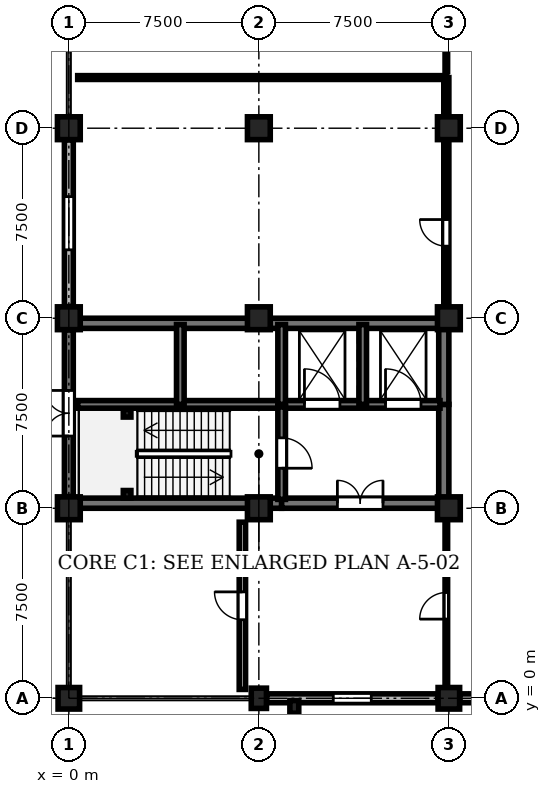
"""IFC4 building model, lengths in metres.
Left out: names, types, materials, properties, quantities, classifications, styles, units other than length and angle.
Written with IfcOpenShell. Run it as: python <this file> out.ifc"""

import sys

from ifc_helpers import new_model, si_unit, direction, frame, frame_2d, origin, origin_with_axes, origin_2d, place, context, subcontext, project, spatial, rectangle, circle, i_section, extrude, element, fill, save


model = new_model("IFC4")
c1 = context("Model", 3, precision=1e-05, world=origin(), true_north=direction((0.0, 1.0)))
c2 = subcontext(c1, "Body", "Model", "MODEL_VIEW")
j1 = project(units=[si_unit("LENGTHUNIT", "METRE"), si_unit("PLANEANGLEUNIT", "RADIAN")], contexts=[c1])
p1 = place(None, origin())
s1 = spatial("IfcSite", under=j1, at=p1, CompositionType="ELEMENT")
p2 = place(p1, origin())
s2 = spatial("IfcBuilding", under=s1, at=p2, CompositionType="ELEMENT")
p3 = place(p2, origin())
s3 = spatial("IfcBuildingStorey", under=s2, at=p3, CompositionType="ELEMENT", Elevation=0.0)
p4 = place(p3, origin_with_axes())
e1 = element("IfcColumn", 1, at=p4, inside=s3, PredefinedType="COLUMN", context=c2, shape_type="SweptSolid", body=[
    extrude(rectangle(XDim=0.85, YDim=0.85, at=origin_2d()), origin(), (0.0, 0.0, 1.0), 4.8),
])
for number, where, z_axis, x_axis in (
    (2, (0.0, 7.5, 0.0), (0.0, 0.0, 1.0), (1.0, 0.0, 0.0)),
    (3, (0.0, 15.0, 0.0), (0.0, 0.0, 1.0), (1.0, 0.0, 0.0)),
):
    element("IfcColumn", number, at=place(p3, frame(where, z_axis=z_axis, x_axis=x_axis)), inside=s3, PredefinedType="COLUMN", context=c2, shape_type="SweptSolid", body=[
        extrude(rectangle(XDim=0.9, YDim=0.9, at=origin_2d()), origin(), (0.0, 0.0, 1.0), 4.8),
    ])
p5 = place(p3, frame((0.0, 22.5, 0.0), z_axis=(0.0, 0.0, 1.0), x_axis=(1.0, 0.0, 0.0)))
e4 = element("IfcColumn", 4, at=p5, inside=s3, PredefinedType="COLUMN", context=c2, shape_type="SweptSolid", body=[
    extrude(circle(Radius=0.45, at=origin_2d()), origin(), (0.0, 0.0, 1.0), 4.8),
])
p6 = place(p3, frame((7.5, 0.0, 0.0), z_axis=(0.0, 0.0, 1.0), x_axis=(1.0, 0.0, 0.0)))
e5 = element("IfcColumn", 5, at=p6, inside=s3, PredefinedType="COLUMN", context=c2, shape_type="SweptSolid", body=[
    extrude(rectangle(XDim=0.6, YDim=0.8, at=origin_2d()), origin(), (0.0, 0.0, 1.0), 4.8),
])
p7 = place(p3, frame((7.5, 7.5, 0.0), z_axis=(0.0, 0.0, 1.0), x_axis=(1.0, 0.0, 0.0)))
e6 = element("IfcColumn", 6, at=p7, inside=s3, PredefinedType="COLUMN", context=c2, shape_type="SweptSolid", body=[
    extrude(rectangle(XDim=0.9, YDim=0.9, at=origin_2d()), origin(), (0.0, 0.0, 1.0), 4.8),
])
p8 = place(p3, frame((7.5, 15.0, 0.0), z_axis=(0.0, 0.0, 1.0), x_axis=(1.0, 0.0, 0.0)))
e7 = element("IfcColumn", 7, at=p8, inside=s3, PredefinedType="COLUMN", context=c2, shape_type="SweptSolid", body=[
    extrude(circle(Radius=0.45, at=origin_2d()), origin(), (0.0, 0.0, 1.0), 4.8),
])
p9 = place(p3, frame((7.5, 22.5, 0.0), z_axis=(0.0, 0.0, 1.0), x_axis=(1.0, 0.0, 0.0)))
e8 = element("IfcColumn", 8, at=p9, inside=s3, PredefinedType="COLUMN", context=c2, shape_type="SweptSolid", body=[
    extrude(rectangle(XDim=0.9, YDim=0.9, at=origin_2d()), origin(), (0.0, 0.0, 1.0), 4.8),
])
p10 = place(p3, frame((15.0, 0.0, 0.0), z_axis=(0.0, 0.0, 1.0), x_axis=(1.0, 0.0, 0.0)))
e9 = element("IfcColumn", 9, at=p10, inside=s3, PredefinedType="COLUMN", context=c2, shape_type="SweptSolid", body=[
    extrude(rectangle(XDim=0.85, YDim=0.85, at=origin_2d()), origin(), (0.0, 0.0, 1.0), 4.8),
])
p11 = place(p3, frame((15.0, 7.5, 0.0), z_axis=(0.0, 0.0, 1.0), x_axis=(1.0, 0.0, 0.0)))
e10 = element("IfcColumn", 10, at=p11, inside=s3, PredefinedType="COLUMN", context=c2, shape_type="SweptSolid", body=[
    extrude(circle(Radius=0.45, at=origin_2d()), origin(), (0.0, 0.0, 1.0), 4.8),
])
for number, where, z_axis, x_axis in (
    (11, (15.0, 15.0, 0.0), (0.0, 0.0, 1.0), (1.0, 0.0, 0.0)),
    (12, (15.0, 22.5, 0.0), (0.0, 0.0, 1.0), (1.0, 0.0, 0.0)),
):
    element("IfcColumn", number, at=place(p3, frame(where, z_axis=z_axis, x_axis=x_axis)), inside=s3, PredefinedType="COLUMN", context=c2, shape_type="SweptSolid", body=[
        extrude(rectangle(XDim=0.9, YDim=0.9, at=origin_2d()), origin(), (0.0, 0.0, 1.0), 4.8),
    ])
p12 = place(p3, frame((8.9, -0.34, 0.0), z_axis=(0.0, 0.0, 1.0), x_axis=(1.0, 0.0, 0.0)))
e13 = element("IfcColumn", 13, at=p12, inside=s3, PredefinedType="PILASTER", context=c2, shape_type="SweptSolid", body=[
    extrude(rectangle(XDim=0.35, YDim=0.5, at=origin_2d()), origin(), (0.0, 0.0, 1.0), 4.1),
])
for number, where, z_axis, x_axis in (
    (14, (2.3, 8.05, 0.0), (0.0, 0.0, 1.0), (1.0, 0.0, 0.0)),
    (15, (2.3, 11.25, 0.0), (0.0, 0.0, 1.0), (1.0, 0.0, 0.0)),
):
    element("IfcColumn", number, at=place(p3, frame(where, z_axis=z_axis, x_axis=x_axis)), inside=s3, PredefinedType="COLUMN", context=c2, shape_type="SweptSolid", body=[
        extrude(i_section(OverallWidth=0.3, OverallDepth=0.3, WebThickness=0.011, FlangeThickness=0.019, FilletRadius=0.027, at=origin_2d()), origin(), (0.0, 0.0, 1.0), 4.8),
    ])
p13 = place(p3, frame((0.0, 7.96, 0.0), z_axis=(0.0, 0.0, 1.0), x_axis=(0.0, 1.0, 0.0)))
e16 = element("IfcWall", 16, at=p13, inside=s3, PredefinedType="SHEAR", context=c2, shape_type="SweptSolid", body=[
    extrude(rectangle(XDim=6.58, YDim=0.35, at=frame_2d((3.29, 0.0))), origin(), (0.0, 0.0, 1.0), 4.5),
])
p14 = place(p13, frame((2.39, 0.0, 0.0)))
e17 = element("IfcOpeningElement", 17, at=p14, cuts=e16, PredefinedType="OPENING", context=c2, shape_type="SweptSolid", body=[
    extrude(rectangle(XDim=1.8, YDim=2.5, at=frame_2d((0.9, 1.25))), frame((0.0, 0.185, 0.0), z_axis=(0.0, -1.0, 0.0), x_axis=(1.0, 0.0, 0.0)), (0.0, 0.0, 1.0), 0.37),
])
p15 = place(p3, frame((0.0, 15.46, 0.0), z_axis=(0.0, 0.0, 1.0), x_axis=(0.0, 1.0, 0.0)))
e18 = element("IfcWall", 18, at=p15, inside=s3, PredefinedType="STANDARD", context=c2, shape_type="SweptSolid", body=[
    extrude(rectangle(XDim=6.58, YDim=0.35, at=frame_2d((3.29, 0.0))), origin(), (0.0, 0.0, 1.0), 3.9),
])
p16 = place(p15, frame((2.24, 0.0, 0.9)))
e19 = element("IfcOpeningElement", 19, at=p16, cuts=e18, PredefinedType="OPENING", context=c2, shape_type="SweptSolid", body=[
    extrude(rectangle(XDim=2.1, YDim=2.4, at=frame_2d((1.05, 1.2))), frame((0.0, 0.185, 0.0), z_axis=(0.0, -1.0, 0.0), x_axis=(1.0, 0.0, 0.0)), (0.0, 0.0, 1.0), 0.37),
])
p17 = place(p3, frame((14.565, 0.0, 0.0), z_axis=(0.0, 0.0, 1.0), x_axis=(-1.0, 0.0, 0.0)))
e20 = element("IfcWall", 20, at=p17, inside=s3, PredefinedType="STANDARD", context=c2, shape_type="SweptSolid", body=[
    extrude(rectangle(XDim=6.755, YDim=0.35, at=frame_2d((3.377, 0.0))), origin(), (0.0, 0.0, 1.0), 3.95),
])
p18 = place(p17, frame((2.627, 0.0, 0.9)))
e21 = element("IfcOpeningElement", 21, at=p18, cuts=e20, PredefinedType="OPENING", context=c2, shape_type="SweptSolid", body=[
    extrude(rectangle(XDim=1.5, YDim=2.4, at=frame_2d((0.75, 1.2))), frame((0.0, 0.185, 0.0), z_axis=(0.0, -1.0, 0.0), x_axis=(1.0, 0.0, 0.0)), (0.0, 0.0, 1.0), 0.37),
])
p19 = place(p3, frame((22.19, 0.0, 0.0), z_axis=(0.0, 0.0, 1.0), x_axis=(-1.0, 0.0, 0.0)))
e22 = element("IfcWall", 22, at=p19, inside=s3, PredefinedType="STANDARD", context=c2, shape_type="SweptSolid", body=[
    extrude(rectangle(XDim=6.755, YDim=0.35, at=frame_2d((3.377, 0.0))), origin(), (0.0, 0.0, 1.0), 3.95),
])
p20 = place(p19, frame((2.327, 0.0, 0.9)))
e23 = element("IfcOpeningElement", 23, at=p20, cuts=e22, PredefinedType="OPENING", context=c2, shape_type="SweptSolid", body=[
    extrude(rectangle(XDim=2.1, YDim=2.4, at=frame_2d((1.05, 1.2))), frame((0.0, 0.185, 0.0), z_axis=(0.0, -1.0, 0.0), x_axis=(1.0, 0.0, 0.0)), (0.0, 0.0, 1.0), 0.37),
])
p21 = place(p3, frame((0.35, 7.7, 0.0), z_axis=(0.0, 0.0, 1.0), x_axis=(1.0, 0.0, 0.0)))
e24 = element("IfcWall", 24, at=p21, inside=s3, PredefinedType="SHEAR", context=c2, shape_type="SweptSolid", body=[
    extrude(rectangle(XDim=8.05, YDim=0.4, at=frame_2d((4.025, 0.0))), origin(), (0.0, 0.0, 1.0), 4.5),
])
p22 = place(p3, frame((8.4, 7.7, 0.0), z_axis=(0.0, 0.0, 1.0), x_axis=(1.0, 0.0, 0.0)))
e25 = element("IfcWall", 25, at=p22, inside=s3, PredefinedType="SHEAR", context=c2, shape_type="SweptSolid", body=[
    extrude(rectangle(XDim=6.25, YDim=0.4, at=frame_2d((3.125, 0.0))), origin(), (0.0, 0.0, 1.0), 4.5),
])
p23 = place(p22, frame((2.2, 0.0, 0.0)))
e26 = element("IfcOpeningElement", 26, at=p23, cuts=e25, PredefinedType="OPENING", context=c2, shape_type="SweptSolid", body=[
    extrude(rectangle(XDim=1.8, YDim=2.25, at=frame_2d((0.9, 1.125))), frame((0.0, 0.21, 0.0), z_axis=(0.0, -1.0, 0.0), x_axis=(1.0, 0.0, 0.0)), (0.0, 0.0, 1.0), 0.42),
])
p24 = place(p3, frame((0.35, 14.8, 0.0), z_axis=(0.0, 0.0, 1.0), x_axis=(1.0, 0.0, 0.0)))
e27 = element("IfcWall", 27, at=p24, inside=s3, PredefinedType="SHEAR", context=c2, shape_type="SweptSolid", body=[
    extrude(rectangle(XDim=14.3, YDim=0.4, at=frame_2d((7.15, 0.0))), origin(), (0.0, 0.0, 1.0), 4.5),
])
p25 = place(p3, frame((14.8, 7.85, 0.0), z_axis=(0.0, 0.0, 1.0), x_axis=(0.0, 1.0, 0.0)))
e28 = element("IfcWall", 28, at=p25, inside=s3, PredefinedType="SHEAR", context=c2, shape_type="SweptSolid", body=[
    extrude(rectangle(XDim=3.75, YDim=0.4, at=frame_2d((1.875, 0.0))), origin(), (0.0, 0.0, 1.0), 4.5),
])
p26 = place(p3, frame((14.8, 11.6, 0.0), z_axis=(0.0, 0.0, 1.0), x_axis=(0.0, 1.0, 0.0)))
e29 = element("IfcWall", 29, at=p26, inside=s3, PredefinedType="SHEAR", context=c2, shape_type="SweptSolid", body=[
    extrude(rectangle(XDim=3.05, YDim=0.4, at=frame_2d((1.525, 0.0))), origin(), (0.0, 0.0, 1.0), 4.5),
])
p27 = place(p3, frame((0.35, 11.6, 0.0), z_axis=(0.0, 0.0, 1.0), x_axis=(1.0, 0.0, 0.0)))
e30 = element("IfcWall", 30, at=p27, inside=s3, PredefinedType="SHEAR", context=c2, shape_type="SweptSolid", body=[
    extrude(rectangle(XDim=8.05, YDim=0.3, at=frame_2d((4.025, 0.0))), origin(), (0.0, 0.0, 1.0), 4.5),
])
p28 = place(p3, frame((8.4, 11.6, 0.0), z_axis=(0.0, 0.0, 1.0), x_axis=(1.0, 0.0, 0.0)))
e31 = element("IfcWall", 31, at=p28, inside=s3, PredefinedType="SHEAR", context=c2, shape_type="SweptSolid", body=[
    extrude(rectangle(XDim=6.25, YDim=0.3, at=frame_2d((3.125, 0.0))), origin(), (0.0, 0.0, 1.0), 4.5),
])
p29 = place(p28, frame((0.9, 0.0, 0.0)))
e32 = element("IfcOpeningElement", 32, at=p29, cuts=e31, PredefinedType="OPENING", context=c2, shape_type="SweptSolid", body=[
    extrude(rectangle(XDim=1.4, YDim=2.25, at=frame_2d((0.7, 1.125))), frame((0.0, 0.16, 0.0), z_axis=(0.0, -1.0, 0.0), x_axis=(1.0, 0.0, 0.0)), (0.0, 0.0, 1.0), 0.32),
])
p30 = place(p28, frame((4.1, 0.0, 0.0)))
e33 = element("IfcOpeningElement", 33, at=p30, cuts=e31, PredefinedType="OPENING", context=c2, shape_type="SweptSolid", body=[
    extrude(rectangle(XDim=1.4, YDim=2.25, at=frame_2d((0.7, 1.125))), frame((0.0, 0.16, 0.0), z_axis=(0.0, -1.0, 0.0), x_axis=(1.0, 0.0, 0.0)), (0.0, 0.0, 1.0), 0.32),
])
p31 = place(p3, frame((8.4, 11.5, 0.0), z_axis=(0.0, 0.0, 1.0), x_axis=(0.0, -1.0, 0.0)))
e34 = element("IfcWall", 34, at=p31, inside=s3, PredefinedType="SHEAR", context=c2, shape_type="SweptSolid", body=[
    extrude(rectangle(XDim=3.65, YDim=0.3, at=frame_2d((1.825, 0.0))), origin(), (0.0, 0.0, 1.0), 4.5),
])
p32 = place(p31, frame((1.22, 0.0, 0.0)))
e35 = element("IfcOpeningElement", 35, at=p32, cuts=e34, PredefinedType="OPENING", context=c2, shape_type="SweptSolid", body=[
    extrude(rectangle(XDim=1.2, YDim=2.25, at=frame_2d((0.6, 1.125))), frame((0.0, 0.16, 0.0), z_axis=(0.0, -1.0, 0.0), x_axis=(1.0, 0.0, 0.0)), (0.0, 0.0, 1.0), 0.32),
])
for number, where, z_axis, x_axis in (
    (36, (4.4, 11.6, 0.0), (0.0, 0.0, 1.0), (0.0, 1.0, 0.0)),
    (37, (8.4, 11.6, 0.0), (0.0, 0.0, 1.0), (0.0, 1.0, 0.0)),
    (38, (11.6, 11.6, 0.0), (0.0, 0.0, 1.0), (0.0, 1.0, 0.0)),
):
    element("IfcWall", number, at=place(p3, frame(where, z_axis=z_axis, x_axis=x_axis)), inside=s3, PredefinedType="SHEAR", context=c2, shape_type="SweptSolid", body=[
        extrude(rectangle(XDim=3.15, YDim=0.3, at=frame_2d((1.575, 0.0))), origin(), (0.0, 0.0, 1.0), 4.5),
    ])
p33 = place(p3, frame((6.85, 0.35, 0.0), z_axis=(0.0, 0.0, 1.0), x_axis=(0.0, 1.0, 0.0)))
e39 = element("IfcWall", 39, at=p33, inside=s3, PredefinedType="STANDARD", context=c2, shape_type="SweptSolid", body=[
    extrude(rectangle(XDim=6.6, YDim=0.25, at=frame_2d((3.3, 0.0))), origin(), (0.0, 0.0, 1.0), 4.485),
])
p34 = place(p33, frame((2.75, 0.0, 0.0)))
e40 = element("IfcOpeningElement", 40, at=p34, cuts=e39, PredefinedType="OPENING", context=c2, shape_type="SweptSolid", body=[
    extrude(rectangle(XDim=1.1, YDim=2.2, at=frame_2d((0.55, 1.1))), frame((0.0, 0.135, 0.0), z_axis=(0.0, -1.0, 0.0), x_axis=(1.0, 0.0, 0.0)), (0.0, 0.0, 1.0), 0.27),
])
p35 = place(p3, frame((14.9, 0.35, 0.0), z_axis=(0.0, 0.0, 1.0), x_axis=(0.0, 1.0, 0.0)))
e41 = element("IfcWall", 41, at=p35, inside=s3, PredefinedType="PARTITIONING", context=c2, shape_type="SweptSolid", body=[
    extrude(rectangle(XDim=6.6, YDim=0.1, at=frame_2d((3.3, 0.0))), origin(), (0.0, 0.0, 1.0), 3.935),
])
p36 = place(p35, frame((2.775, 0.0, 0.0)))
e42 = element("IfcOpeningElement", 42, at=p36, cuts=e41, PredefinedType="OPENING", context=c2, shape_type="SweptSolid", body=[
    extrude(rectangle(XDim=1.05, YDim=2.2, at=frame_2d((0.525, 1.1))), frame((0.0, 0.06, 0.0), z_axis=(0.0, -1.0, 0.0), x_axis=(1.0, 0.0, 0.0)), (0.0, 0.0, 1.0), 0.12),
])
p37 = place(p3, frame((14.9, 15.3, 0.0), z_axis=(0.0, 0.0, 1.0), x_axis=(0.0, 1.0, 0.0)))
e43 = element("IfcWall", 43, at=p37, inside=s3, PredefinedType="STANDARD", context=c2, shape_type="SweptSolid", body=[
    extrude(rectangle(XDim=9.2, YDim=0.2, at=frame_2d((4.6, 0.0))), origin(), (0.0, 0.0, 1.0), 3.785),
])
p38 = place(p37, frame((2.545, 0.0, 0.0)))
e44 = element("IfcOpeningElement", 44, at=p38, cuts=e43, PredefinedType="OPENING", context=c2, shape_type="SweptSolid", body=[
    extrude(rectangle(XDim=1.05, YDim=2.2, at=frame_2d((0.525, 1.1))), frame((0.0, 0.11, 0.0), z_axis=(0.0, -1.0, 0.0), x_axis=(1.0, 0.0, 0.0)), (0.0, 0.0, 1.0), 0.22),
])
p39 = place(p3, frame((14.9, 24.75, 0.0), z_axis=(0.0, 0.0, 1.0), x_axis=(0.0, 1.0, 0.0)))
e45 = element("IfcWall", 45, at=p39, inside=s3, PredefinedType="PARTITIONING", context=c2, shape_type="SweptSolid", body=[
    extrude(rectangle(XDim=9.75, YDim=0.1, at=frame_2d((4.875, 0.0))), origin(), (0.0, 0.0, 1.0), 3.785),
])
p40 = place(p39, frame((1.89, 0.0, 0.0)))
e46 = element("IfcOpeningElement", 46, at=p40, cuts=e45, PredefinedType="OPENING", context=c2, shape_type="SweptSolid", body=[
    extrude(rectangle(XDim=1.05, YDim=2.2, at=frame_2d((0.525, 1.1))), frame((0.0, 0.06, 0.0), z_axis=(0.0, -1.0, 0.0), x_axis=(1.0, 0.0, 0.0)), (0.0, 0.0, 1.0), 0.12),
])
p41 = place(p3, frame((0.35, 24.5, 0.0), z_axis=(0.0, 0.0, 1.0), x_axis=(1.0, 0.0, 0.0)))
e47 = element("IfcWall", 47, at=p41, inside=s3, PredefinedType="PARTITIONING", context=c2, shape_type="SweptSolid", body=[
    extrude(rectangle(XDim=14.55, YDim=0.15, at=frame_2d((7.275, 0.0))), origin(), (0.0, 0.0, 1.0), 4.485),
])
p42 = place(p14, origin())
e48 = element("IfcDoor", 48, at=p42, inside=s3, OperationType="DOUBLE_DOOR_SINGLE_SWING", PredefinedType="DOOR", context=c2, shape_type="SweptSolid", body=[
    extrude(rectangle(XDim=1.8, YDim=2.5, at=frame_2d((0.9, 1.25))), frame((0.0, 0.025, 0.0), z_axis=(0.0, -1.0, 0.0), x_axis=(1.0, 0.0, 0.0)), (0.0, 0.0, 1.0), 0.05),
])
fill(e17, e48)
p43 = place(p16, origin())
e49 = element("IfcWindow", 49, at=p43, inside=s3, PartitioningType="SINGLE_PANEL", PredefinedType="WINDOW", context=c2, shape_type="SweptSolid", body=[
    extrude(rectangle(XDim=2.1, YDim=2.4, at=frame_2d((1.05, 1.2))), frame((0.0, 0.03, 0.0), z_axis=(0.0, -1.0, 0.0), x_axis=(1.0, 0.0, 0.0)), (0.0, 0.0, 1.0), 0.06),
])
fill(e19, e49)
p44 = place(p18, origin())
e50 = element("IfcWindow", 50, at=p44, inside=s3, PartitioningType="SINGLE_PANEL", PredefinedType="WINDOW", context=c2, shape_type="SweptSolid", body=[
    extrude(rectangle(XDim=1.5, YDim=2.4, at=frame_2d((0.75, 1.2))), frame((0.0, 0.03, 0.0), z_axis=(0.0, -1.0, 0.0), x_axis=(1.0, 0.0, 0.0)), (0.0, 0.0, 1.0), 0.06),
])
fill(e21, e50)
p45 = place(p23, origin())
e51 = element("IfcDoor", 51, at=p45, inside=s3, OperationType="DOUBLE_DOOR_SINGLE_SWING", PredefinedType="DOOR", context=c2, shape_type="SweptSolid", body=[
    extrude(rectangle(XDim=1.8, YDim=2.25, at=frame_2d((0.9, 1.125))), frame((0.0, 0.025, 0.0), z_axis=(0.0, -1.0, 0.0), x_axis=(1.0, 0.0, 0.0)), (0.0, 0.0, 1.0), 0.05),
])
fill(e26, e51)
p46 = place(p29, origin())
e52 = element("IfcDoor", 52, at=p46, inside=s3, OperationType="DOUBLE_DOOR_SLIDING", PredefinedType="DOOR", context=c2, shape_type="SweptSolid", body=[
    extrude(rectangle(XDim=1.4, YDim=2.25, at=frame_2d((0.7, 1.125))), frame((0.0, 0.025, 0.0), z_axis=(0.0, -1.0, 0.0), x_axis=(1.0, 0.0, 0.0)), (0.0, 0.0, 1.0), 0.05),
])
fill(e32, e52)
p47 = place(p30, origin())
e53 = element("IfcDoor", 53, at=p47, inside=s3, OperationType="DOUBLE_DOOR_SLIDING", PredefinedType="DOOR", context=c2, shape_type="SweptSolid", body=[
    extrude(rectangle(XDim=1.4, YDim=2.25, at=frame_2d((0.7, 1.125))), frame((0.0, 0.025, 0.0), z_axis=(0.0, -1.0, 0.0), x_axis=(1.0, 0.0, 0.0)), (0.0, 0.0, 1.0), 0.05),
])
fill(e33, e53)
p48 = place(p32, origin())
e54 = element("IfcDoor", 54, at=p48, inside=s3, OperationType="SINGLE_SWING_RIGHT", PredefinedType="DOOR", context=c2, shape_type="SweptSolid", body=[
    extrude(rectangle(XDim=1.2, YDim=2.25, at=frame_2d((0.6, 1.125))), frame((0.0, 0.025, 0.0), z_axis=(0.0, -1.0, 0.0), x_axis=(1.0, 0.0, 0.0)), (0.0, 0.0, 1.0), 0.05),
])
fill(e35, e54)
p49 = place(p34, origin())
e55 = element("IfcDoor", 55, at=p49, inside=s3, OperationType="SINGLE_SWING_RIGHT", PredefinedType="DOOR", context=c2, shape_type="SweptSolid", body=[
    extrude(rectangle(XDim=1.1, YDim=2.2, at=frame_2d((0.55, 1.1))), frame((0.0, 0.025, 0.0), z_axis=(0.0, -1.0, 0.0), x_axis=(1.0, 0.0, 0.0)), (0.0, 0.0, 1.0), 0.05),
])
fill(e40, e55)
p50 = place(p36, origin())
e56 = element("IfcDoor", 56, at=p50, inside=s3, OperationType="SINGLE_SWING_LEFT", PredefinedType="DOOR", context=c2, shape_type="SweptSolid", body=[
    extrude(rectangle(XDim=1.05, YDim=2.2, at=frame_2d((0.525, 1.1))), frame((0.0, 0.025, 0.0), z_axis=(0.0, -1.0, 0.0), x_axis=(1.0, 0.0, 0.0)), (0.0, 0.0, 1.0), 0.05),
])
fill(e42, e56)
p51 = place(p38, origin())
e57 = element("IfcDoor", 57, at=p51, inside=s3, OperationType="SINGLE_SWING_RIGHT", PredefinedType="DOOR", context=c2, shape_type="SweptSolid", body=[
    extrude(rectangle(XDim=1.05, YDim=2.2, at=frame_2d((0.525, 1.1))), frame((0.0, 0.025, 0.0), z_axis=(0.0, -1.0, 0.0), x_axis=(1.0, 0.0, 0.0)), (0.0, 0.0, 1.0), 0.05),
])
fill(e44, e57)
save(model, sys.argv[1])
